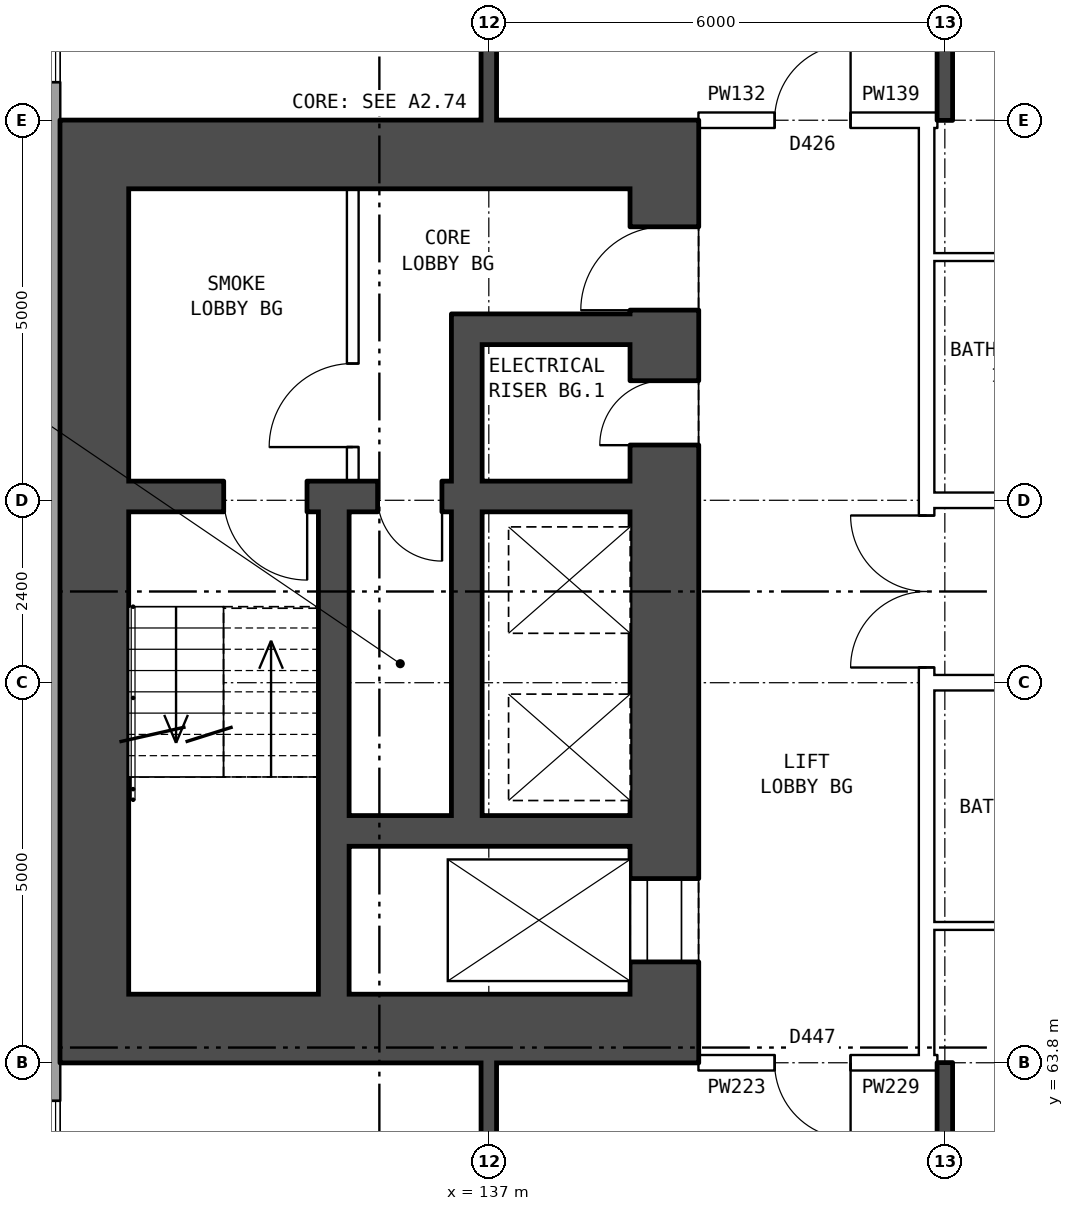
"""IFC4 building model, lengths in metres.
Left out: names, types, materials, properties, quantities, classifications, styles, units other than length and angle.
Written with IfcOpenShell. Run it as: python <this file> out.ifc"""

import sys

from ifc_helpers import new_model, si_unit, direction, frame, frame_2d, origin, place, context, subcontext, project, spatial, rectangle, extrude, element, fill, save


model = new_model("IFC4")
c1 = context("Model", 3, precision=1e-05, world=origin(), true_north=direction((0.0, 1.0)))
c2 = subcontext(c1, "Body", "Model", "MODEL_VIEW")
j1 = project(units=[si_unit("LENGTHUNIT", "METRE"), si_unit("PLANEANGLEUNIT", "RADIAN")], contexts=[c1])
p1 = place(None, origin())
s1 = spatial("IfcSite", under=j1, at=p1, CompositionType="ELEMENT")
p2 = place(p1, origin())
s2 = spatial("IfcBuilding", under=s1, at=p2, CompositionType="ELEMENT")
p3 = place(p2, frame((0.0, 0.0, 19.5)))
s3 = spatial("IfcBuildingStorey", under=s2, at=p3, CompositionType="ELEMENT", Elevation=19.5)
p4 = place(p3, frame((131.18, 82.925, 0.0), z_axis=(0.0, 0.0, 1.0), x_axis=(0.0, -1.0, 0.0)))
e1 = element("IfcWall", 1, at=p4, inside=s3, PredefinedType="STANDARD", context=c2, shape_type="SweptSolid", body=[
    extrude(rectangle(XDim=25.851, YDim=0.36, at=frame_2d((12.925, 0.0))), origin(), (0.0, 0.0, 1.0), 2.85),
])
p5 = place(p4, frame((1.475, 0.0, 0.8)))
e2 = element("IfcOpeningElement", 2, at=p5, cuts=e1, PredefinedType="OPENING", context=c2, shape_type="SweptSolid", body=[
    extrude(rectangle(XDim=1.0, YDim=1.2, at=frame_2d((0.5, 0.6))), frame((0.0, 0.19, 0.0), z_axis=(0.0, -1.0, 0.0), x_axis=(1.0, 0.0, 0.0)), (0.0, 0.0, 1.0), 0.38),
])
p6 = place(p4, frame((4.625, 0.0, 0.8)))
e3 = element("IfcOpeningElement", 3, at=p6, cuts=e1, PredefinedType="OPENING", context=c2, shape_type="SweptSolid", body=[
    extrude(rectangle(XDim=1.6, YDim=1.8, at=frame_2d((0.8, 0.9))), frame((0.0, 0.19, 0.0), z_axis=(0.0, -1.0, 0.0), x_axis=(1.0, 0.0, 0.0)), (0.0, 0.0, 1.0), 0.38),
])
p7 = place(p4, frame((19.625, 0.0, 0.8)))
e4 = element("IfcOpeningElement", 4, at=p7, cuts=e1, PredefinedType="OPENING", context=c2, shape_type="SweptSolid", body=[
    extrude(rectangle(XDim=1.6, YDim=1.8, at=frame_2d((0.8, 0.9))), frame((0.0, 0.19, 0.0), z_axis=(0.0, -1.0, 0.0), x_axis=(1.0, 0.0, 0.0)), (0.0, 0.0, 1.0), 0.38),
])
p8 = place(p4, frame((21.525, 0.0, 0.8)))
e5 = element("IfcOpeningElement", 5, at=p8, cuts=e1, PredefinedType="OPENING", context=c2, shape_type="SweptSolid", body=[
    extrude(rectangle(XDim=1.4, YDim=1.8, at=frame_2d((0.7, 0.9))), frame((0.0, 0.19, 0.0), z_axis=(0.0, -1.0, 0.0), x_axis=(1.0, 0.0, 0.0)), (0.0, 0.0, 1.0), 0.38),
])
p9 = place(p4, frame((2.775, 0.0, 0.8)))
e6 = element("IfcOpeningElement", 6, at=p9, cuts=e1, PredefinedType="OPENING", context=c2, shape_type="SweptSolid", body=[
    extrude(rectangle(XDim=1.4, YDim=1.8, at=frame_2d((0.7, 0.9))), frame((0.0, 0.19, 0.0), z_axis=(0.0, -1.0, 0.0), x_axis=(1.0, 0.0, 0.0)), (0.0, 0.0, 1.0), 0.38),
])
p10 = place(p4, frame((23.225, 0.0, 0.8)))
e7 = element("IfcOpeningElement", 7, at=p10, cuts=e1, PredefinedType="OPENING", context=c2, shape_type="SweptSolid", body=[
    extrude(rectangle(XDim=1.0, YDim=1.2, at=frame_2d((0.5, 0.6))), frame((0.0, 0.19, 0.0), z_axis=(0.0, -1.0, 0.0), x_axis=(1.0, 0.0, 0.0)), (0.0, 0.0, 1.0), 0.38),
])
p11 = place(p3, frame((139.31, 64.7, 0.0), z_axis=(0.0, 0.0, 1.0), x_axis=(0.0, 1.0, 0.0)))
e8 = element("IfcWall", 8, at=p11, inside=s3, PredefinedType="SHEAR", context=c2, shape_type="SweptSolid", body=[
    extrude(rectangle(XDim=10.6, YDim=0.9, at=frame_2d((5.3, 0.0))), origin(), (0.0, 0.0, 1.0), 2.85),
])
p12 = place(p11, frame((0.425, 0.0, 0.0)))
e9 = element("IfcOpeningElement", 9, at=p12, cuts=e8, PredefinedType="OPENING", context=c2, shape_type="SweptSolid", body=[
    extrude(rectangle(XDim=1.1, YDim=2.1, at=frame_2d((0.55, 1.05))), frame((0.0, 0.46, 0.0), z_axis=(0.0, -1.0, 0.0), x_axis=(1.0, 0.0, 0.0)), (0.0, 0.0, 1.0), 0.92),
])
p13 = place(p11, frame((9.0, 0.0, 0.0)))
e10 = element("IfcOpeningElement", 10, at=p13, cuts=e8, PredefinedType="OPENING", context=c2, shape_type="SweptSolid", body=[
    extrude(rectangle(XDim=1.1, YDim=2.1, at=frame_2d((0.55, 1.05))), frame((0.0, 0.46, 0.0), z_axis=(0.0, -1.0, 0.0), x_axis=(1.0, 0.0, 0.0)), (0.0, 0.0, 1.0), 0.92),
])
p14 = place(p11, frame((7.225, 0.0, 0.0)))
e11 = element("IfcOpeningElement", 11, at=p14, cuts=e8, PredefinedType="OPENING", context=c2, shape_type="SweptSolid", body=[
    extrude(rectangle(XDim=0.85, YDim=2.1, at=frame_2d((0.425, 1.05))), frame((0.0, 0.46, 0.0), z_axis=(0.0, -1.0, 0.0), x_axis=(1.0, 0.0, 0.0)), (0.0, 0.0, 1.0), 0.92),
])
p15 = place(p3, frame((131.81, 64.7, 0.0), z_axis=(0.0, 0.0, 1.0), x_axis=(0.0, 1.0, 0.0)))
e12 = element("IfcWall", 12, at=p15, inside=s3, PredefinedType="SHEAR", context=c2, shape_type="SweptSolid", body=[
    extrude(rectangle(XDim=10.6, YDim=0.9, at=frame_2d((5.3, 0.0))), origin(), (0.0, 0.0, 1.0), 2.85),
])
for number, where, z_axis, x_axis in (
    (13, (139.76, 64.25, 0.0), (0.0, 0.0, 1.0), (-1.0, 0.0, 0.0)),
    (14, (139.76, 75.75, 0.0), (0.0, 0.0, 1.0), (-1.0, 0.0, 0.0)),
):
    element("IfcWall", number, at=place(p3, frame(where, z_axis=z_axis, x_axis=x_axis)), inside=s3, PredefinedType="SHEAR", context=c2, shape_type="SweptSolid", body=[
        extrude(rectangle(XDim=8.4, YDim=0.9, at=frame_2d((4.2, 0.0))), origin(), (0.0, 0.0, 1.0), 2.85),
    ])
p16 = place(p3, frame((138.86, 66.85, 0.0), z_axis=(0.0, 0.0, 1.0), x_axis=(-1.0, 0.0, 0.0)))
e15 = element("IfcWall", 15, at=p16, inside=s3, PredefinedType="SHEAR", context=c2, shape_type="SweptSolid", body=[
    extrude(rectangle(XDim=3.7, YDim=0.4, at=frame_2d((1.85, 0.0))), origin(), (0.0, 0.0, 1.0), 2.85),
])
p17 = place(p3, frame((138.86, 71.25, 0.0), z_axis=(0.0, 0.0, 1.0), x_axis=(-1.0, 0.0, 0.0)))
e16 = element("IfcWall", 16, at=p17, inside=s3, PredefinedType="SHEAR", context=c2, shape_type="SweptSolid", body=[
    extrude(rectangle(XDim=6.6, YDim=0.4, at=frame_2d((3.3, 0.0))), origin(), (0.0, 0.0, 1.0), 2.85),
])
p18 = place(p17, frame((4.25, 0.0, 0.0)))
e17 = element("IfcOpeningElement", 17, at=p18, cuts=e16, PredefinedType="OPENING", context=c2, shape_type="SweptSolid", body=[
    extrude(rectangle(XDim=1.1, YDim=2.1, at=frame_2d((0.55, 1.05))), frame((0.0, 0.21, 0.0), z_axis=(0.0, -1.0, 0.0), x_axis=(1.0, 0.0, 0.0)), (0.0, 0.0, 1.0), 0.42),
])
p19 = place(p17, frame((2.475, 0.0, 0.0)))
e18 = element("IfcOpeningElement", 18, at=p19, cuts=e16, PredefinedType="OPENING", context=c2, shape_type="SweptSolid", body=[
    extrude(rectangle(XDim=0.85, YDim=2.1, at=frame_2d((0.425, 1.05))), frame((0.0, 0.21, 0.0), z_axis=(0.0, -1.0, 0.0), x_axis=(1.0, 0.0, 0.0)), (0.0, 0.0, 1.0), 0.42),
])
p20 = place(p3, frame((138.86, 73.45, 0.0), z_axis=(0.0, 0.0, 1.0), x_axis=(-1.0, 0.0, 0.0)))
e19 = element("IfcWall", 19, at=p20, inside=s3, PredefinedType="SHEAR", context=c2, shape_type="SweptSolid", body=[
    extrude(rectangle(XDim=1.95, YDim=0.4, at=frame_2d((0.975, 0.0))), origin(), (0.0, 0.0, 1.0), 2.85),
])
p21 = place(p3, frame((136.71, 67.05, 0.0), z_axis=(0.0, 0.0, 1.0), x_axis=(0.0, 1.0, 0.0)))
e20 = element("IfcWall", 20, at=p21, inside=s3, PredefinedType="SHEAR", context=c2, shape_type="SweptSolid", body=[
    extrude(rectangle(XDim=4.0, YDim=0.4, at=frame_2d((2.0, 0.0))), origin(), (0.0, 0.0, 1.0), 2.85),
])
p22 = place(p3, frame((136.71, 71.45, 0.0), z_axis=(0.0, 0.0, 1.0), x_axis=(0.0, 1.0, 0.0)))
e21 = element("IfcWall", 21, at=p22, inside=s3, PredefinedType="SHEAR", context=c2, shape_type="SweptSolid", body=[
    extrude(rectangle(XDim=2.2, YDim=0.4, at=frame_2d((1.1, 0.0))), origin(), (0.0, 0.0, 1.0), 2.85),
])
p23 = place(p3, frame((135.21, 71.45, 0.0), z_axis=(0.0, 0.0, 1.0), x_axis=(0.0, 1.0, 0.0)))
e22 = element("IfcWall", 22, at=p23, inside=s3, PredefinedType="PARTITIONING", context=c2, shape_type="SweptSolid", body=[
    extrude(rectangle(XDim=3.85, YDim=0.15, at=frame_2d((1.925, 0.0))), origin(), (0.0, 0.0, 1.0), 2.85),
])
p24 = place(p23, frame((0.45, 0.0, 0.0)))
e23 = element("IfcOpeningElement", 23, at=p24, cuts=e22, PredefinedType="OPENING", context=c2, shape_type="SweptSolid", body=[
    extrude(rectangle(XDim=1.1, YDim=2.1, at=frame_2d((0.55, 1.05))), frame((0.0, 0.085, 0.0), z_axis=(0.0, -1.0, 0.0), x_axis=(1.0, 0.0, 0.0)), (0.0, 0.0, 1.0), 0.17),
])
p25 = place(p3, frame((134.96, 64.7, 0.0), z_axis=(0.0, 0.0, 1.0), x_axis=(0.0, 1.0, 0.0)))
e24 = element("IfcWall", 24, at=p25, inside=s3, PredefinedType="SHEAR", context=c2, shape_type="SweptSolid", body=[
    extrude(rectangle(XDim=6.35, YDim=0.4, at=frame_2d((3.175, 0.0))), origin(), (0.0, 0.0, 1.0), 2.85),
])
p26 = place(p3, frame((142.76, 63.9, 0.0), z_axis=(0.0, 0.0, 1.0), x_axis=(0.0, 1.0, 0.0)))
e25 = element("IfcWall", 25, at=p26, inside=s3, PredefinedType="PARTITIONING", context=c2, shape_type="SweptSolid", body=[
    extrude(rectangle(XDim=12.2, YDim=0.2, at=frame_2d((6.1, 0.0))), origin(), (0.0, 0.0, 1.0), 2.85),
])
p27 = place(p26, frame((5.1, 0.0, 0.0)))
e26 = element("IfcOpeningElement", 26, at=p27, cuts=e25, PredefinedType="OPENING", context=c2, shape_type="SweptSolid", body=[
    extrude(rectangle(XDim=2.0, YDim=2.1, at=frame_2d((1.0, 1.05))), frame((0.0, 0.11, 0.0), z_axis=(0.0, -1.0, 0.0), x_axis=(1.0, 0.0, 0.0)), (0.0, 0.0, 1.0), 0.22),
])
p28 = place(p3, frame((139.76, 63.8, 0.0), z_axis=(0.0, 0.0, 1.0), x_axis=(1.0, 0.0, 0.0)))
e27 = element("IfcWall", 27, at=p28, inside=s3, PredefinedType="PARTITIONING", context=c2, shape_type="SweptSolid", body=[
    extrude(rectangle(XDim=3.0, YDim=0.2, at=frame_2d((1.5, 0.0))), origin(), (0.0, 0.0, 1.0), 2.85),
])
p29 = place(p28, frame((1.0, 0.0, 0.0)))
e28 = element("IfcOpeningElement", 28, at=p29, cuts=e27, PredefinedType="OPENING", context=c2, shape_type="SweptSolid", body=[
    extrude(rectangle(XDim=1.0, YDim=2.1, at=frame_2d((0.5, 1.05))), frame((0.0, 0.11, 0.0), z_axis=(0.0, -1.0, 0.0), x_axis=(1.0, 0.0, 0.0)), (0.0, 0.0, 1.0), 0.22),
])
p30 = place(p3, frame((142.76, 63.8, 0.0), z_axis=(0.0, 0.0, 1.0), x_axis=(1.0, 0.0, 0.0)))
e29 = element("IfcWall", 29, at=p30, inside=s3, PredefinedType="PARTITIONING", context=c2, shape_type="SweptSolid", body=[
    extrude(rectangle(XDim=0.14, YDim=0.2, at=frame_2d((0.07, 0.0))), origin(), (0.0, 0.0, 1.0), 2.85),
])
p31 = place(p3, frame((142.76, 65.6, 0.0), z_axis=(0.0, 0.0, 1.0), x_axis=(1.0, 0.0, 0.0)))
e30 = element("IfcWall", 30, at=p31, inside=s3, PredefinedType="PARTITIONING", context=c2, shape_type="SweptSolid", body=[
    extrude(rectangle(XDim=3.24, YDim=0.1, at=frame_2d((1.62, 0.0))), origin(), (0.0, 0.0, 1.0), 2.85),
])
p32 = place(p3, frame((142.76, 68.8, 0.0), z_axis=(0.0, 0.0, 1.0), x_axis=(1.0, 0.0, 0.0)))
e31 = element("IfcWall", 31, at=p32, inside=s3, PredefinedType="PARTITIONING", context=c2, shape_type="SweptSolid", body=[
    extrude(rectangle(XDim=14.48, YDim=0.2, at=frame_2d((7.24, 0.0))), origin(), (0.0, 0.0, 1.0), 2.85),
])
p33 = place(p32, frame((4.24, 0.0, 0.0)))
e32 = element("IfcOpeningElement", 32, at=p33, cuts=e31, PredefinedType="OPENING", context=c2, shape_type="SweptSolid", body=[
    extrude(rectangle(XDim=1.0, YDim=2.1, at=frame_2d((0.5, 1.05))), frame((0.0, 0.11, 0.0), z_axis=(0.0, -1.0, 0.0), x_axis=(1.0, 0.0, 0.0)), (0.0, 0.0, 1.0), 0.22),
])
p34 = place(p32, frame((7.24, 0.0, 0.0)))
e33 = element("IfcOpeningElement", 33, at=p34, cuts=e31, PredefinedType="OPENING", context=c2, shape_type="SweptSolid", body=[
    extrude(rectangle(XDim=1.0, YDim=2.1, at=frame_2d((0.5, 1.05))), frame((0.0, 0.11, 0.0), z_axis=(0.0, -1.0, 0.0), x_axis=(1.0, 0.0, 0.0)), (0.0, 0.0, 1.0), 0.22),
])
p35 = place(p3, frame((142.76, 71.2, 0.0), z_axis=(0.0, 0.0, 1.0), x_axis=(1.0, 0.0, 0.0)))
e34 = element("IfcWall", 34, at=p35, inside=s3, PredefinedType="PARTITIONING", context=c2, shape_type="SweptSolid", body=[
    extrude(rectangle(XDim=14.48, YDim=0.2, at=frame_2d((7.24, 0.0))), origin(), (0.0, 0.0, 1.0), 2.85),
])
p36 = place(p35, frame((4.24, 0.0, 0.0)))
e35 = element("IfcOpeningElement", 35, at=p36, cuts=e34, PredefinedType="OPENING", context=c2, shape_type="SweptSolid", body=[
    extrude(rectangle(XDim=1.0, YDim=2.1, at=frame_2d((0.5, 1.05))), frame((0.0, 0.11, 0.0), z_axis=(0.0, -1.0, 0.0), x_axis=(1.0, 0.0, 0.0)), (0.0, 0.0, 1.0), 0.22),
])
p37 = place(p35, frame((10.24, 0.0, 0.0)))
e36 = element("IfcOpeningElement", 36, at=p37, cuts=e34, PredefinedType="OPENING", context=c2, shape_type="SweptSolid", body=[
    extrude(rectangle(XDim=1.0, YDim=2.1, at=frame_2d((0.5, 1.05))), frame((0.0, 0.11, 0.0), z_axis=(0.0, -1.0, 0.0), x_axis=(1.0, 0.0, 0.0)), (0.0, 0.0, 1.0), 0.22),
])
p38 = place(p3, frame((142.76, 74.4, 0.0), z_axis=(0.0, 0.0, 1.0), x_axis=(1.0, 0.0, 0.0)))
e37 = element("IfcWall", 37, at=p38, inside=s3, PredefinedType="PARTITIONING", context=c2, shape_type="SweptSolid", body=[
    extrude(rectangle(XDim=3.24, YDim=0.1, at=frame_2d((1.62, 0.0))), origin(), (0.0, 0.0, 1.0), 2.85),
])
p39 = place(p3, frame((139.76, 76.2, 0.0), z_axis=(0.0, 0.0, 1.0), x_axis=(1.0, 0.0, 0.0)))
e38 = element("IfcWall", 38, at=p39, inside=s3, PredefinedType="PARTITIONING", context=c2, shape_type="SweptSolid", body=[
    extrude(rectangle(XDim=3.0, YDim=0.2, at=frame_2d((1.5, 0.0))), origin(), (0.0, 0.0, 1.0), 2.85),
])
p40 = place(p39, frame((1.0, 0.0, 0.0)))
e39 = element("IfcOpeningElement", 39, at=p40, cuts=e38, PredefinedType="OPENING", context=c2, shape_type="SweptSolid", body=[
    extrude(rectangle(XDim=1.0, YDim=2.1, at=frame_2d((0.5, 1.05))), frame((0.0, 0.11, 0.0), z_axis=(0.0, -1.0, 0.0), x_axis=(1.0, 0.0, 0.0)), (0.0, 0.0, 1.0), 0.22),
])
p41 = place(p3, frame((142.76, 76.2, 0.0), z_axis=(0.0, 0.0, 1.0), x_axis=(1.0, 0.0, 0.0)))
e40 = element("IfcWall", 40, at=p41, inside=s3, PredefinedType="PARTITIONING", context=c2, shape_type="SweptSolid", body=[
    extrude(rectangle(XDim=0.14, YDim=0.2, at=frame_2d((0.07, 0.0))), origin(), (0.0, 0.0, 1.0), 2.85),
])
p42 = place(p3, frame((137.0, 54.36, 0.0), z_axis=(0.0, 0.0, 1.0), x_axis=(0.0, 1.0, 0.0)))
e41 = element("IfcWall", 41, at=p42, inside=s3, PredefinedType="SOLIDWALL", context=c2, shape_type="SweptSolid", body=[
    extrude(rectangle(XDim=9.44, YDim=0.2, at=frame_2d((4.72, 0.0))), origin(), (0.0, 0.0, 1.0), 2.85),
])
p43 = place(p42, frame((7.04, 0.0, 0.0)))
e42 = element("IfcOpeningElement", 42, at=p43, cuts=e41, PredefinedType="OPENING", context=c2, shape_type="SweptSolid", body=[
    extrude(rectangle(XDim=0.9, YDim=2.1, at=frame_2d((0.45, 1.05))), frame((0.0, 0.11, 0.0), z_axis=(0.0, -1.0, 0.0), x_axis=(1.0, 0.0, 0.0)), (0.0, 0.0, 1.0), 0.22),
])
p44 = place(p3, frame((137.0, 76.2, 0.0), z_axis=(0.0, 0.0, 1.0), x_axis=(0.0, 1.0, 0.0)))
e43 = element("IfcWall", 43, at=p44, inside=s3, PredefinedType="SOLIDWALL", context=c2, shape_type="SweptSolid", body=[
    extrude(rectangle(XDim=9.44, YDim=0.2, at=frame_2d((4.72, 0.0))), origin(), (0.0, 0.0, 1.0), 2.85),
])
p45 = place(p44, frame((1.5, 0.0, 0.0)))
e44 = element("IfcOpeningElement", 44, at=p45, cuts=e43, PredefinedType="OPENING", context=c2, shape_type="SweptSolid", body=[
    extrude(rectangle(XDim=0.9, YDim=2.1, at=frame_2d((0.45, 1.05))), frame((0.0, 0.11, 0.0), z_axis=(0.0, -1.0, 0.0), x_axis=(1.0, 0.0, 0.0)), (0.0, 0.0, 1.0), 0.22),
])
for number, where, z_axis, x_axis in (
    (45, (143.0, 54.36, 0.0), (0.0, 0.0, 1.0), (0.0, 1.0, 0.0)),
    (46, (143.0, 76.2, 0.0), (0.0, 0.0, 1.0), (0.0, 1.0, 0.0)),
):
    element("IfcWall", number, at=place(p3, frame(where, z_axis=z_axis, x_axis=x_axis)), inside=s3, PredefinedType="SOLIDWALL", context=c2, shape_type="SweptSolid", body=[
        extrude(rectangle(XDim=9.44, YDim=0.2, at=frame_2d((4.72, 0.0))), origin(), (0.0, 0.0, 1.0), 2.85),
    ])
p46 = place(p6, origin())
e47 = element("IfcWindow", 47, at=p46, inside=s3, PartitioningType="SINGLE_PANEL", PredefinedType="WINDOW", context=c2, shape_type="SweptSolid", body=[
    extrude(rectangle(XDim=1.6, YDim=1.8, at=frame_2d((0.8, 0.9))), frame((0.0, 0.15, 0.0), z_axis=(0.0, -1.0, 0.0), x_axis=(1.0, 0.0, 0.0)), (0.0, 0.0, 1.0), 0.06),
])
fill(e3, e47)
p47 = place(p7, origin())
e48 = element("IfcWindow", 48, at=p47, inside=s3, PartitioningType="SINGLE_PANEL", PredefinedType="WINDOW", context=c2, shape_type="SweptSolid", body=[
    extrude(rectangle(XDim=1.6, YDim=1.8, at=frame_2d((0.8, 0.9))), frame((0.0, 0.15, 0.0), z_axis=(0.0, -1.0, 0.0), x_axis=(1.0, 0.0, 0.0)), (0.0, 0.0, 1.0), 0.06),
])
fill(e4, e48)
p48 = place(p12, origin())
e49 = element("IfcDoor", 49, at=p48, inside=s3, OperationType="DOUBLE_DOOR_SLIDING", PredefinedType="DOOR", context=c2, shape_type="SweptSolid", body=[
    extrude(rectangle(XDim=1.1, YDim=2.1, at=frame_2d((0.55, 1.05))), frame((0.0, 0.435, 0.0), z_axis=(0.0, -1.0, 0.0), x_axis=(1.0, 0.0, 0.0)), (0.0, 0.0, 1.0), 0.05),
])
fill(e9, e49)
p49 = place(p13, origin())
e50 = element("IfcDoor", 50, at=p49, inside=s3, OperationType="SINGLE_SWING_LEFT", PredefinedType="DOOR", context=c2, shape_type="SweptSolid", body=[
    extrude(rectangle(XDim=1.1, YDim=2.1, at=frame_2d((0.55, 1.05))), frame((0.0, 0.435, 0.0), z_axis=(0.0, -1.0, 0.0), x_axis=(1.0, 0.0, 0.0)), (0.0, 0.0, 1.0), 0.05),
])
fill(e10, e50)
p50 = place(p24, origin())
e51 = element("IfcDoor", 51, at=p50, inside=s3, OperationType="SINGLE_SWING_LEFT", PredefinedType="DOOR", context=c2, shape_type="SweptSolid", body=[
    extrude(rectangle(XDim=1.1, YDim=2.1, at=frame_2d((0.55, 1.05))), frame((0.0, 0.025, 0.0), z_axis=(0.0, -1.0, 0.0), x_axis=(1.0, 0.0, 0.0)), (0.0, 0.0, 1.0), 0.05),
])
fill(e23, e51)
p51 = place(p18, origin())
e52 = element("IfcDoor", 52, at=p51, inside=s3, OperationType="SINGLE_SWING_LEFT", PredefinedType="DOOR", context=c2, shape_type="SweptSolid", body=[
    extrude(rectangle(XDim=1.1, YDim=2.1, at=frame_2d((0.55, 1.05))), frame((0.0, 0.025, 0.0), z_axis=(0.0, -1.0, 0.0), x_axis=(1.0, 0.0, 0.0)), (0.0, 0.0, 1.0), 0.05),
])
fill(e17, e52)
p52 = place(p14, origin())
e53 = element("IfcDoor", 53, at=p52, inside=s3, OperationType="SINGLE_SWING_LEFT", PredefinedType="DOOR", context=c2, shape_type="SweptSolid", body=[
    extrude(rectangle(XDim=0.85, YDim=2.1, at=frame_2d((0.425, 1.05))), frame((0.0, 0.435, 0.0), z_axis=(0.0, -1.0, 0.0), x_axis=(1.0, 0.0, 0.0)), (0.0, 0.0, 1.0), 0.05),
])
fill(e11, e53)
p53 = place(p19, origin())
e54 = element("IfcDoor", 54, at=p53, inside=s3, OperationType="SINGLE_SWING_LEFT", PredefinedType="DOOR", context=c2, shape_type="SweptSolid", body=[
    extrude(rectangle(XDim=0.85, YDim=2.1, at=frame_2d((0.425, 1.05))), frame((0.0, 0.025, 0.0), z_axis=(0.0, -1.0, 0.0), x_axis=(1.0, 0.0, 0.0)), (0.0, 0.0, 1.0), 0.05),
])
fill(e18, e54)
p54 = place(p27, origin())
e55 = element("IfcDoor", 55, at=p54, inside=s3, OperationType="DOUBLE_DOOR_SINGLE_SWING", PredefinedType="DOOR", context=c2, shape_type="SweptSolid", body=[
    extrude(rectangle(XDim=2.0, YDim=2.1, at=frame_2d((1.0, 1.05))), frame((0.0, 0.025, 0.0), z_axis=(0.0, -1.0, 0.0), x_axis=(1.0, 0.0, 0.0)), (0.0, 0.0, 1.0), 0.05),
])
fill(e26, e55)
p55 = place(p29, frame((1.0, 0.0, 0.0), z_axis=(0.0, 0.0, 1.0), x_axis=(-1.0, 0.0, 0.0)))
e56 = element("IfcDoor", 56, at=p55, inside=s3, OperationType="SINGLE_SWING_LEFT", PredefinedType="DOOR", context=c2, shape_type="SweptSolid", body=[
    extrude(rectangle(XDim=1.0, YDim=2.1, at=frame_2d((0.5, 1.05))), frame((0.0, 0.025, 0.0), z_axis=(0.0, -1.0, 0.0), x_axis=(1.0, 0.0, 0.0)), (0.0, 0.0, 1.0), 0.05),
])
fill(e28, e56)
p56 = place(p40, origin())
e57 = element("IfcDoor", 57, at=p56, inside=s3, OperationType="SINGLE_SWING_RIGHT", PredefinedType="DOOR", context=c2, shape_type="SweptSolid", body=[
    extrude(rectangle(XDim=1.0, YDim=2.1, at=frame_2d((0.5, 1.05))), frame((0.0, 0.025, 0.0), z_axis=(0.0, -1.0, 0.0), x_axis=(1.0, 0.0, 0.0)), (0.0, 0.0, 1.0), 0.05),
])
fill(e39, e57)
save(model, sys.argv[1])
